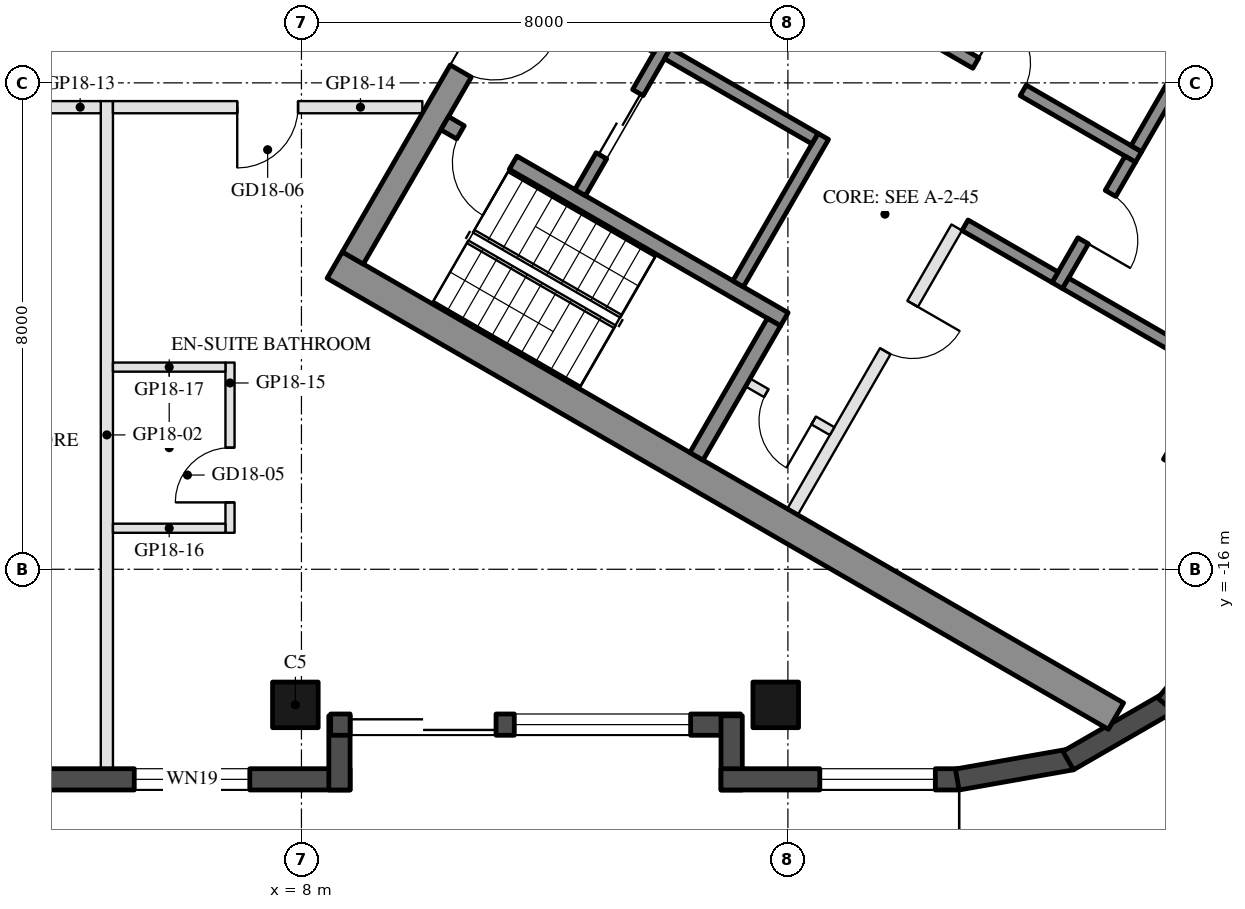
"""IFC4 building model, lengths in metres.
Left out: names, types, materials, properties, quantities, classifications, styles, units other than length and angle.
Written with IfcOpenShell. Run it as: python <this file> out.ifc"""

import sys

from ifc_helpers import new_model, si_unit, direction, frame, frame_2d, origin, origin_2d, place, context, subcontext, project, spatial, rectangle, hollow_rectangle, extrude, element, fill, save


model = new_model("IFC4")
c1 = context("Model", 3, precision=1e-05, world=origin(), true_north=direction((0.0, 1.0)))
c2 = subcontext(c1, "Body", "Model", "MODEL_VIEW")
j1 = project(units=[si_unit("LENGTHUNIT", "METRE"), si_unit("PLANEANGLEUNIT", "RADIAN")], contexts=[c1])
p1 = place(None, origin())
s1 = spatial("IfcSite", under=j1, at=p1, CompositionType="ELEMENT")
p2 = place(p1, origin())
s2 = spatial("IfcBuilding", under=s1, at=p2, CompositionType="ELEMENT")
p3 = place(p2, frame((0.0, 0.0, 194.7)))
s3 = spatial("IfcBuildingStorey", under=s2, at=p3, CompositionType="ELEMENT", Elevation=194.7)
for number, where, z_axis, x_axis in (
    (1, (7.9, -18.23, 0.0), (0.0, 0.0, 1.0), (-1.0, 0.0, 0.0)),
    (2, (15.8, -18.23, 0.0), (0.0, 0.0, 1.0), (-1.0, 0.0, 0.0)),
):
    element("IfcColumn", number, at=place(p3, frame(where, z_axis=z_axis, x_axis=x_axis)), inside=s3, PredefinedType="COLUMN", context=c2, shape_type="SweptSolid", body=[
        extrude(hollow_rectangle(XDim=0.75, YDim=0.75, WallThickness=0.035, at=origin_2d()), origin(), (0.0, 0.0, 1.0), 3.7),
    ])
p4 = place(p3, frame((23.729, -13.7, 0.0), z_axis=(0.0, 0.0, 1.0), x_axis=(0.5, 0.866025403784, 0.0)))
e3 = element("IfcColumn", 3, at=p4, inside=s3, PredefinedType="COLUMN", context=c2, shape_type="SweptSolid", body=[
    extrude(hollow_rectangle(XDim=2.4, YDim=2.2, WallThickness=0.06, at=origin_2d()), origin(), (0.0, 0.0, 1.0), 3.7),
])
p5 = place(p3, frame((-0.9, -19.455, 0.0), z_axis=(0.0, 0.0, 1.0), x_axis=(1.0, 0.0, 0.0)))
e4 = element("IfcWall", 4, at=p5, inside=s3, PredefinedType="SOLIDWALL", context=c2, shape_type="SweptSolid", body=[
    extrude(rectangle(XDim=9.7, YDim=0.35, at=frame_2d((4.85, 0.0))), origin(), (0.0, 0.0, 1.0), 3.55),
])
p6 = place(p5, frame((6.15, 0.0, 0.3)))
e5 = element("IfcOpeningElement", 5, at=p6, cuts=e4, PredefinedType="OPENING", context=c2, shape_type="SweptSolid", body=[
    extrude(rectangle(XDim=1.9, YDim=2.65, at=frame_2d((0.95, 1.325))), frame((0.0, 0.185, 0.0), z_axis=(0.0, -1.0, 0.0), x_axis=(1.0, 0.0, 0.0)), (0.0, 0.0, 1.0), 0.37),
])
p7 = place(p3, frame((8.625, -19.63, 0.0), z_axis=(0.0, 0.0, 1.0), x_axis=(0.0, 1.0, 0.0)))
e6 = element("IfcWall", 6, at=p7, inside=s3, PredefinedType="SOLIDWALL", context=c2, shape_type="SweptSolid", body=[
    extrude(rectangle(XDim=1.22, YDim=0.35, at=frame_2d((0.61, 0.0))), origin(), (0.0, 0.0, 1.0), 3.55),
])
p8 = place(p3, frame((8.48, -18.555, 0.0), z_axis=(0.0, 0.0, 1.0), x_axis=(1.0, 0.0, 0.0)))
e7 = element("IfcWall", 7, at=p8, inside=s3, PredefinedType="SOLIDWALL", context=c2, shape_type="SweptSolid", body=[
    extrude(rectangle(XDim=6.74, YDim=0.35, at=frame_2d((3.37, 0.0))), origin(), (0.0, 0.0, 1.0), 3.55),
])
p9 = place(p8, frame((0.32, 0.0, 0.0)))
e8 = element("IfcOpeningElement", 8, at=p9, cuts=e7, PredefinedType="OPENING", context=c2, shape_type="SweptSolid", body=[
    extrude(rectangle(XDim=2.4, YDim=2.4, at=frame_2d((1.2, 1.2))), frame((0.0, 0.185, 0.0), z_axis=(0.0, -1.0, 0.0), x_axis=(1.0, 0.0, 0.0)), (0.0, 0.0, 1.0), 0.37),
])
p10 = place(p8, frame((3.02, 0.0, 0.3)))
e9 = element("IfcOpeningElement", 9, at=p10, cuts=e7, PredefinedType="OPENING", context=c2, shape_type="SweptSolid", body=[
    extrude(rectangle(XDim=2.9, YDim=2.65, at=frame_2d((1.45, 1.325))), frame((0.0, 0.185, 0.0), z_axis=(0.0, -1.0, 0.0), x_axis=(1.0, 0.0, 0.0)), (0.0, 0.0, 1.0), 0.37),
])
p11 = place(p3, frame((15.075, -18.41, 0.0), z_axis=(0.0, 0.0, 1.0), x_axis=(0.0, -1.0, 0.0)))
e10 = element("IfcWall", 10, at=p11, inside=s3, PredefinedType="SOLIDWALL", context=c2, shape_type="SweptSolid", body=[
    extrude(rectangle(XDim=1.22, YDim=0.35, at=frame_2d((0.61, 0.0))), origin(), (0.0, 0.0, 1.0), 3.55),
])
p12 = place(p3, frame((14.9, -19.455, 0.0), z_axis=(0.0, 0.0, 1.0), x_axis=(1.0, 0.0, 0.0)))
e11 = element("IfcWall", 11, at=p12, inside=s3, PredefinedType="SOLIDWALL", context=c2, shape_type="SweptSolid", body=[
    extrude(rectangle(XDim=3.916, YDim=0.35, at=frame_2d((1.958, 0.0))), origin(), (0.0, 0.0, 1.0), 3.55),
])
p13 = place(p12, frame((1.625, 0.0, 0.3)))
e12 = element("IfcOpeningElement", 12, at=p13, cuts=e11, PredefinedType="OPENING", context=c2, shape_type="SweptSolid", body=[
    extrude(rectangle(XDim=1.9, YDim=2.65, at=frame_2d((0.95, 1.325))), frame((0.0, 0.185, 0.0), z_axis=(0.0, -1.0, 0.0), x_axis=(1.0, 0.0, 0.0)), (0.0, 0.0, 1.0), 0.37),
])
p14 = place(p3, frame((18.785, -19.458, 0.0), z_axis=(0.0, 0.0, 1.0), x_axis=(0.984798995425, 0.173697837091, 0.0)))
e13 = element("IfcWall", 13, at=p14, inside=s3, PredefinedType="SOLIDWALL", context=c2, shape_type="SweptSolid", body=[
    extrude(rectangle(XDim=1.91, YDim=0.35, at=frame_2d((0.955, 0.0))), origin(), (0.0, 0.0, 1.0), 3.55),
])
for number, where, z_axis, x_axis in (
    (14, (20.61, -19.147, 0.0), (0.0, 0.0, 1.0), (0.866, 0.5, 0.0)),
    (15, (22.217, -18.231, 0.0), (0.0, 0.0, 1.0), (0.643, 0.766, 0.0)),
):
    element("IfcWall", number, at=place(p3, frame(where, z_axis=z_axis, x_axis=x_axis)), inside=s3, PredefinedType="SOLIDWALL", context=c2, shape_type="SweptSolid", body=[
        extrude(rectangle(XDim=1.91, YDim=0.35, at=frame_2d((0.955, 0.0))), origin(), (0.0, 0.0, 1.0), 3.55),
    ])
for number, where, z_axis, x_axis in (
    (16, (8.547, -10.997, 0.0), (0.0, 0.0, 1.0), (0.866, -0.5, 0.0)),
    (17, (13.797, -1.903, 0.0), (0.0, 0.0, 1.0), (0.866, -0.5, 0.0)),
):
    element("IfcWall", number, at=place(p3, frame(where, z_axis=z_axis, x_axis=x_axis)), inside=s3, PredefinedType="SHEAR", context=c2, shape_type="SweptSolid", body=[
        extrude(rectangle(XDim=14.837, YDim=0.5, at=frame_2d((7.418, 0.0))), origin(), (0.0, 0.0, 1.0), 3.5),
    ])
p15 = place(p3, frame((8.845, -10.88, 0.0), z_axis=(0.0, 0.0, 1.0), x_axis=(0.500004234368, 0.866022959057, 0.0)))
e18 = element("IfcWall", 18, at=p15, inside=s3, PredefinedType="SHEAR", context=c2, shape_type="SweptSolid", body=[
    extrude(rectangle(XDim=10.0, YDim=0.4, at=frame_2d((5.0, 0.0))), origin(), (0.0, 0.0, 1.0), 3.5),
])
p16 = place(p15, frame((3.55, 0.0, 0.0)))
e19 = element("IfcOpeningElement", 19, at=p16, cuts=e18, PredefinedType="OPENING", context=c2, shape_type="SweptSolid", body=[
    extrude(rectangle(XDim=1.1, YDim=2.1, at=frame_2d((0.55, 1.05))), frame((0.0, 0.21, 0.0), z_axis=(0.0, -1.0, 0.0), x_axis=(1.0, 0.0, 0.0)), (0.0, 0.0, 1.0), 0.42),
])
p17 = place(p15, frame((5.85, 0.0, 0.0)))
e20 = element("IfcOpeningElement", 20, at=p17, cuts=e18, PredefinedType="OPENING", context=c2, shape_type="SweptSolid", body=[
    extrude(rectangle(XDim=1.4, YDim=2.1, at=frame_2d((0.7, 1.05))), frame((0.0, 0.21, 0.0), z_axis=(0.0, -1.0, 0.0), x_axis=(1.0, 0.0, 0.0)), (0.0, 0.0, 1.0), 0.42),
])
p18 = place(p3, frame((10.356, -8.664, 0.0), z_axis=(0.0, 0.0, 1.0), x_axis=(0.866028629588, -0.499994412703, 0.0)))
e21 = element("IfcWall", 21, at=p18, inside=s3, PredefinedType="SHEAR", context=c2, shape_type="SweptSolid", body=[
    extrude(rectangle(XDim=6.45, YDim=0.25, at=frame_2d((3.225, 0.0))), origin(), (0.0, 0.0, 1.0), 3.5),
])
p19 = place(p18, frame((0.3, 0.0, 0.0)))
e22 = element("IfcOpeningElement", 22, at=p19, cuts=e21, PredefinedType="OPENING", context=c2, shape_type="SweptSolid", body=[
    extrude(rectangle(XDim=1.0, YDim=2.1, at=frame_2d((0.5, 1.05))), frame((0.0, 0.135, 0.0), z_axis=(0.0, -1.0, 0.0), x_axis=(1.0, 0.0, 0.0)), (0.0, 0.0, 1.0), 0.27),
])
p20 = place(p3, frame((14.496, -14.143, 0.0), z_axis=(0.0, 0.0, 1.0), x_axis=(0.500062241894, 0.865989465428, 0.0)))
e23 = element("IfcWall", 23, at=p20, inside=s3, PredefinedType="SHEAR", context=c2, shape_type="SweptSolid", body=[
    extrude(rectangle(XDim=2.55, YDim=0.25, at=frame_2d((1.275, 0.0))), origin(), (0.0, 0.0, 1.0), 3.5),
])
p21 = place(p3, frame((15.181, -11.305, 0.0), z_axis=(0.0, 0.0, 1.0), x_axis=(0.49994636267, 0.866056369097, 0.0)))
e24 = element("IfcWall", 24, at=p21, inside=s3, PredefinedType="SHEAR", context=c2, shape_type="SweptSolid", body=[
    extrude(rectangle(XDim=2.8, YDim=0.2, at=frame_2d((1.4, 0.0))), origin(), (0.0, 0.0, 1.0), 3.5),
])
p22 = place(p3, frame((12.583, -9.805, 0.0), z_axis=(0.0, 0.0, 1.0), x_axis=(0.49994636267, 0.866056369097, 0.0)))
e25 = element("IfcWall", 25, at=p22, inside=s3, PredefinedType="SHEAR", context=c2, shape_type="SweptSolid", body=[
    extrude(rectangle(XDim=2.8, YDim=0.2, at=frame_2d((1.4, 0.0))), origin(), (0.0, 0.0, 1.0), 3.5),
])
p23 = place(p22, frame((0.7, 0.0, 0.0)))
e26 = element("IfcOpeningElement", 26, at=p23, cuts=e25, PredefinedType="OPENING", context=c2, shape_type="SweptSolid", body=[
    extrude(rectangle(XDim=1.2, YDim=2.1, at=frame_2d((0.6, 1.05))), frame((0.0, 0.11, 0.0), z_axis=(0.0, -1.0, 0.0), x_axis=(1.0, 0.0, 0.0)), (0.0, 0.0, 1.0), 0.22),
])
p24 = place(p3, frame((11.768, -6.217, 0.0), z_axis=(0.0, 0.0, 1.0), x_axis=(0.866050077142, -0.499957262057, 0.0)))
e27 = element("IfcWall", 27, at=p24, inside=s3, PredefinedType="SHEAR", context=c2, shape_type="SweptSolid", body=[
    extrude(rectangle(XDim=2.4, YDim=0.2, at=frame_2d((1.2, 0.0))), origin(), (0.0, 0.0, 1.0), 3.5),
])
p25 = place(p3, frame((14.02, -7.517, 0.0), z_axis=(0.0, 0.0, 1.0), x_axis=(0.866034573852, -0.49998411664, 0.0)))
e28 = element("IfcWall", 28, at=p25, inside=s3, PredefinedType="SHEAR", context=c2, shape_type="SweptSolid", body=[
    extrude(rectangle(XDim=2.8, YDim=0.2, at=frame_2d((1.4, 0.0))), origin(), (0.0, 0.0, 1.0), 3.5),
])
p26 = place(p3, frame((12.968, -4.138, 0.0), z_axis=(0.0, 0.0, 1.0), x_axis=(0.866028328073, -0.49999493495, 0.0)))
e29 = element("IfcWall", 29, at=p26, inside=s3, PredefinedType="SHEAR", context=c2, shape_type="SweptSolid", body=[
    extrude(rectangle(XDim=10.16, YDim=0.2, at=frame_2d((5.08, 0.0))), origin(), (0.0, 0.0, 1.0), 3.5),
])
p27 = place(p26, frame((1.99, 0.0, 0.0)))
e30 = element("IfcOpeningElement", 30, at=p27, cuts=e29, PredefinedType="OPENING", context=c2, shape_type="SweptSolid", body=[
    extrude(rectangle(XDim=0.9, YDim=2.1, at=frame_2d((0.45, 1.05))), frame((0.0, 0.11, 0.0), z_axis=(0.0, -1.0, 0.0), x_axis=(1.0, 0.0, 0.0)), (0.0, 0.0, 1.0), 0.22),
])
p28 = place(p26, frame((7.07, 0.0, 0.0)))
e31 = element("IfcOpeningElement", 31, at=p28, cuts=e29, PredefinedType="OPENING", context=c2, shape_type="SweptSolid", body=[
    extrude(rectangle(XDim=0.9, YDim=2.1, at=frame_2d((0.45, 1.05))), frame((0.0, 0.11, 0.0), z_axis=(0.0, -1.0, 0.0), x_axis=(1.0, 0.0, 0.0)), (0.0, 0.0, 1.0), 0.22),
])
p29 = place(p3, frame((20.43, -11.333, 0.0), z_axis=(0.0, 0.0, 1.0), x_axis=(0.500001309137, 0.866024647952, 0.0)))
e32 = element("IfcWall", 32, at=p29, inside=s3, PredefinedType="SHEAR", context=c2, shape_type="SweptSolid", body=[
    extrude(rectangle(XDim=2.4, YDim=0.2, at=frame_2d((1.2, 0.0))), origin(), (0.0, 0.0, 1.0), 3.5),
])
p30 = place(p29, frame((0.85, 0.0, 0.0)))
e33 = element("IfcOpeningElement", 33, at=p30, cuts=e32, PredefinedType="OPENING", context=c2, shape_type="SweptSolid", body=[
    extrude(rectangle(XDim=0.9, YDim=2.1, at=frame_2d((0.45, 1.05))), frame((0.0, 0.11, 0.0), z_axis=(0.0, -1.0, 0.0), x_axis=(1.0, 0.0, 0.0)), (0.0, 0.0, 1.0), 0.22),
])
p31 = place(p3, frame((18.913, -10.342, 0.0), z_axis=(0.0, 0.0, 1.0), x_axis=(0.866038183914, -0.499977863513, 0.0)))
e34 = element("IfcWall", 34, at=p31, inside=s3, PredefinedType="SHEAR", context=c2, shape_type="SweptSolid", body=[
    extrude(rectangle(XDim=1.71, YDim=0.2, at=frame_2d((0.855, 0.0))), origin(), (0.0, 0.0, 1.0), 3.5),
])
p32 = place(p3, frame((21.73, -9.082, 0.0), z_axis=(0.0, 0.0, 1.0), x_axis=(0.50002537861, 0.866010750942, 0.0)))
e35 = element("IfcWall", 35, at=p32, inside=s3, PredefinedType="SHEAR", context=c2, shape_type="SweptSolid", body=[
    extrude(rectangle(XDim=2.0, YDim=0.2, at=frame_2d((1.0, 0.0))), origin(), (0.0, 0.0, 1.0), 3.5),
])
p33 = place(p3, frame((20.567, -11.297, 0.0), z_axis=(0.0, 0.0, 1.0), x_axis=(0.866055327414, -0.49994816717, 0.0)))
e36 = element("IfcWall", 36, at=p33, inside=s3, PredefinedType="SHEAR", context=c2, shape_type="SweptSolid", body=[
    extrude(rectangle(XDim=2.84, YDim=0.2, at=frame_2d((1.42, 0.0))), origin(), (0.0, 0.0, 1.0), 3.5),
])
p34 = place(p3, frame((16.076, -15.055, 0.0), z_axis=(0.0, 0.0, 1.0), x_axis=(0.499995103361, 0.866028230842, 0.0)))
e37 = element("IfcWall", 37, at=p34, inside=s3, PredefinedType="PARTITIONING", context=c2, shape_type="SweptSolid", body=[
    extrude(rectangle(XDim=5.4, YDim=0.2, at=frame_2d((2.7, 0.0))), origin(), (0.0, 0.0, 1.0), 3.5),
])
p35 = place(p34, frame((3.05, 0.0, 0.0)))
e38 = element("IfcOpeningElement", 38, at=p35, cuts=e37, PredefinedType="OPENING", context=c2, shape_type="SweptSolid", body=[
    extrude(rectangle(XDim=0.9, YDim=2.1, at=frame_2d((0.45, 1.05))), frame((0.0, 0.11, 0.0), z_axis=(0.0, -1.0, 0.0), x_axis=(1.0, 0.0, 0.0)), (0.0, 0.0, 1.0), 0.22),
])
p36 = place(p3, frame((15.342, -12.928, 0.0), z_axis=(0.0, 0.0, 1.0), x_axis=(0.865989903783, -0.500061482766, 0.0)))
e39 = element("IfcWall", 39, at=p36, inside=s3, PredefinedType="PARTITIONING", context=c2, shape_type="SweptSolid", body=[
    extrude(rectangle(XDim=1.6, YDim=0.15, at=frame_2d((0.8, 0.0))), origin(), (0.0, 0.0, 1.0), 3.5),
])
p37 = place(p36, frame((0.35, 0.0, 0.0)))
e40 = element("IfcOpeningElement", 40, at=p37, cuts=e39, PredefinedType="OPENING", context=c2, shape_type="SweptSolid", body=[
    extrude(rectangle(XDim=0.9, YDim=2.1, at=frame_2d((0.45, 1.05))), frame((0.0, 0.085, 0.0), z_axis=(0.0, -1.0, 0.0), x_axis=(1.0, 0.0, 0.0)), (0.0, 0.0, 1.0), 0.17),
])
p38 = place(p3, frame((4.8, -19.28, 0.0), z_axis=(0.0, 0.0, 1.0), x_axis=(0.0, 1.0, 0.0)))
e41 = element("IfcWall", 41, at=p38, inside=s3, PredefinedType="PARTITIONING", context=c2, shape_type="SweptSolid", body=[
    extrude(rectangle(XDim=10.98, YDim=0.2, at=frame_2d((5.49, 0.0))), origin(), (0.0, 0.0, 1.0), 3.06),
])
p39 = place(p3, frame((4.7, -8.4, 0.0), z_axis=(0.0, 0.0, 1.0), x_axis=(-1.0, 0.0, 0.0)))
e42 = element("IfcWall", 42, at=p39, inside=s3, PredefinedType="PARTITIONING", context=c2, shape_type="SweptSolid", body=[
    extrude(rectangle(XDim=2.826, YDim=0.2, at=frame_2d((1.413, 0.0))), origin(), (0.0, 0.0, 1.0), 2.95),
])
p40 = place(p39, frame((0.963, 0.0, 0.0)))
e43 = element("IfcOpeningElement", 43, at=p40, cuts=e42, PredefinedType="OPENING", context=c2, shape_type="SweptSolid", body=[
    extrude(rectangle(XDim=0.9, YDim=2.1, at=frame_2d((0.45, 1.05))), frame((0.0, 0.11, 0.0), z_axis=(0.0, -1.0, 0.0), x_axis=(1.0, 0.0, 0.0)), (0.0, 0.0, 1.0), 0.22),
])
p41 = place(p3, frame((9.988, -8.4, 0.0), z_axis=(0.0, 0.0, 1.0), x_axis=(-1.0, 0.0, 0.0)))
e44 = element("IfcWall", 44, at=p41, inside=s3, PredefinedType="PARTITIONING", context=c2, shape_type="SweptSolid", body=[
    extrude(rectangle(XDim=5.088, YDim=0.2, at=frame_2d((2.544, 0.0))), origin(), (0.0, 0.0, 1.0), 2.95),
])
p42 = place(p41, frame((2.044, 0.0, 0.0)))
e45 = element("IfcOpeningElement", 45, at=p42, cuts=e44, PredefinedType="OPENING", context=c2, shape_type="SweptSolid", body=[
    extrude(rectangle(XDim=1.0, YDim=2.1, at=frame_2d((0.5, 1.05))), frame((0.0, 0.11, 0.0), z_axis=(0.0, -1.0, 0.0), x_axis=(1.0, 0.0, 0.0)), (0.0, 0.0, 1.0), 0.22),
])
p43 = place(p3, frame((6.825, -15.4, 0.0), z_axis=(0.0, 0.0, 1.0), x_axis=(0.0, 1.0, 0.0)))
e46 = element("IfcWall", 46, at=p43, inside=s3, PredefinedType="PARTITIONING", context=c2, shape_type="SweptSolid", body=[
    extrude(rectangle(XDim=2.8, YDim=0.15, at=frame_2d((1.4, 0.0))), origin(), (0.0, 0.0, 1.0), 3.55),
])
p44 = place(p43, frame((0.5, 0.0, 0.0)))
e47 = element("IfcOpeningElement", 47, at=p44, cuts=e46, PredefinedType="OPENING", context=c2, shape_type="SweptSolid", body=[
    extrude(rectangle(XDim=0.9, YDim=2.1, at=frame_2d((0.45, 1.05))), frame((0.0, 0.085, 0.0), z_axis=(0.0, -1.0, 0.0), x_axis=(1.0, 0.0, 0.0)), (0.0, 0.0, 1.0), 0.17),
])
for number, where, z_axis, x_axis in (
    (48, (4.9, -15.325, 0.0), (0.0, 0.0, 1.0), (1.0, 0.0, 0.0)),
    (49, (4.9, -12.675, 0.0), (0.0, 0.0, 1.0), (1.0, 0.0, 0.0)),
):
    element("IfcWall", number, at=place(p3, frame(where, z_axis=z_axis, x_axis=x_axis)), inside=s3, PredefinedType="PARTITIONING", context=c2, shape_type="SweptSolid", body=[
        extrude(rectangle(XDim=1.85, YDim=0.15, at=frame_2d((0.925, 0.0))), origin(), (0.0, 0.0, 1.0), 3.55),
    ])
p45 = place(p6, origin())
e50 = element("IfcWindow", 50, at=p45, inside=s3, PartitioningType="SINGLE_PANEL", PredefinedType="WINDOW", context=c2, shape_type="SweptSolid", body=[
    extrude(rectangle(XDim=1.9, YDim=2.65, at=frame_2d((0.95, 1.325))), frame((0.0, 0.03, 0.0), z_axis=(0.0, -1.0, 0.0), x_axis=(1.0, 0.0, 0.0)), (0.0, 0.0, 1.0), 0.06),
])
fill(e5, e50)
p46 = place(p9, frame((2.4, 0.0, 0.0), z_axis=(0.0, 0.0, 1.0), x_axis=(-1.0, 0.0, 0.0)))
e51 = element("IfcDoor", 51, at=p46, inside=s3, OperationType="SLIDING_TO_LEFT", PredefinedType="DOOR", context=c2, shape_type="SweptSolid", body=[
    extrude(rectangle(XDim=2.4, YDim=2.4, at=frame_2d((1.2, 1.2))), frame((0.0, 0.025, 0.0), z_axis=(0.0, -1.0, 0.0), x_axis=(1.0, 0.0, 0.0)), (0.0, 0.0, 1.0), 0.05),
])
fill(e8, e51)
p47 = place(p10, origin())
e52 = element("IfcWindow", 52, at=p47, inside=s3, PartitioningType="SINGLE_PANEL", PredefinedType="WINDOW", context=c2, shape_type="SweptSolid", body=[
    extrude(rectangle(XDim=2.9, YDim=2.65, at=frame_2d((1.45, 1.325))), frame((0.0, 0.03, 0.0), z_axis=(0.0, -1.0, 0.0), x_axis=(1.0, 0.0, 0.0)), (0.0, 0.0, 1.0), 0.06),
])
fill(e9, e52)
p48 = place(p13, origin())
e53 = element("IfcWindow", 53, at=p48, inside=s3, PartitioningType="SINGLE_PANEL", PredefinedType="WINDOW", context=c2, shape_type="SweptSolid", body=[
    extrude(rectangle(XDim=1.9, YDim=2.65, at=frame_2d((0.95, 1.325))), frame((0.0, 0.03, 0.0), z_axis=(0.0, -1.0, 0.0), x_axis=(1.0, 0.0, 0.0)), (0.0, 0.0, 1.0), 0.06),
])
fill(e12, e53)
p49 = place(p23, origin())
e54 = element("IfcDoor", 54, at=p49, inside=s3, OperationType="DOUBLE_DOOR_SLIDING", PredefinedType="DOOR", context=c2, shape_type="SweptSolid", body=[
    extrude(rectangle(XDim=1.2, YDim=2.1, at=frame_2d((0.6, 1.05))), frame((0.0, 0.025, 0.0), z_axis=(0.0, -1.0, 0.0), x_axis=(1.0, 0.0, 0.0)), (0.0, 0.0, 1.0), 0.05),
])
fill(e26, e54)
p50 = place(p37, frame((0.9, 0.0, 0.0), z_axis=(0.0, 0.0, 1.0), x_axis=(-1.0, 0.0, 0.0)))
e55 = element("IfcDoor", 55, at=p50, inside=s3, OperationType="SINGLE_SWING_LEFT", PredefinedType="DOOR", context=c2, shape_type="SweptSolid", body=[
    extrude(rectangle(XDim=0.9, YDim=2.1, at=frame_2d((0.45, 1.05))), frame((0.0, 0.025, 0.0), z_axis=(0.0, -1.0, 0.0), x_axis=(1.0, 0.0, 0.0)), (0.0, 0.0, 1.0), 0.05),
])
fill(e40, e55)
p51 = place(p28, origin())
e56 = element("IfcDoor", 56, at=p51, inside=s3, OperationType="SINGLE_SWING_LEFT", PredefinedType="DOOR", context=c2, shape_type="SweptSolid", body=[
    extrude(rectangle(XDim=0.9, YDim=2.1, at=frame_2d((0.45, 1.05))), frame((0.0, 0.025, 0.0), z_axis=(0.0, -1.0, 0.0), x_axis=(1.0, 0.0, 0.0)), (0.0, 0.0, 1.0), 0.05),
])
fill(e31, e56)
p52 = place(p30, frame((0.9, 0.0, 0.0), z_axis=(0.0, 0.0, 1.0), x_axis=(-1.0, 0.0, 0.0)))
e57 = element("IfcDoor", 57, at=p52, inside=s3, OperationType="SINGLE_SWING_RIGHT", PredefinedType="DOOR", context=c2, shape_type="SweptSolid", body=[
    extrude(rectangle(XDim=0.9, YDim=2.1, at=frame_2d((0.45, 1.05))), frame((0.0, 0.025, 0.0), z_axis=(0.0, -1.0, 0.0), x_axis=(1.0, 0.0, 0.0)), (0.0, 0.0, 1.0), 0.05),
])
fill(e33, e57)
p53 = place(p35, frame((0.9, 0.0, 0.0), z_axis=(0.0, 0.0, 1.0), x_axis=(-1.0, 0.0, 0.0)))
e58 = element("IfcDoor", 58, at=p53, inside=s3, OperationType="SINGLE_SWING_LEFT", PredefinedType="DOOR", context=c2, shape_type="SweptSolid", body=[
    extrude(rectangle(XDim=0.9, YDim=2.1, at=frame_2d((0.45, 1.05))), frame((0.0, 0.025, 0.0), z_axis=(0.0, -1.0, 0.0), x_axis=(1.0, 0.0, 0.0)), (0.0, 0.0, 1.0), 0.05),
])
fill(e38, e58)
p54 = place(p16, frame((1.1, 0.0, 0.0), z_axis=(0.0, 0.0, 1.0), x_axis=(-1.0, 0.0, 0.0)))
e59 = element("IfcDoor", 59, at=p54, inside=s3, OperationType="SINGLE_SWING_LEFT", PredefinedType="DOOR", context=c2, shape_type="SweptSolid", body=[
    extrude(rectangle(XDim=1.1, YDim=2.1, at=frame_2d((0.55, 1.05))), frame((0.0, 0.025, 0.0), z_axis=(0.0, -1.0, 0.0), x_axis=(1.0, 0.0, 0.0)), (0.0, 0.0, 1.0), 0.05),
])
fill(e19, e59)
p55 = place(p19, frame((1.0, 0.0, 0.0), z_axis=(0.0, 0.0, 1.0), x_axis=(-1.0, 0.0, 0.0)))
e60 = element("IfcDoor", 60, at=p55, inside=s3, OperationType="SINGLE_SWING_LEFT", PredefinedType="DOOR", context=c2, shape_type="SweptSolid", body=[
    extrude(rectangle(XDim=1.0, YDim=2.1, at=frame_2d((0.5, 1.05))), frame((0.0, 0.025, 0.0), z_axis=(0.0, -1.0, 0.0), x_axis=(1.0, 0.0, 0.0)), (0.0, 0.0, 1.0), 0.05),
])
fill(e22, e60)
p56 = place(p44, origin())
e61 = element("IfcDoor", 61, at=p56, inside=s3, OperationType="SINGLE_SWING_LEFT", PredefinedType="DOOR", context=c2, shape_type="SweptSolid", body=[
    extrude(rectangle(XDim=0.9, YDim=2.1, at=frame_2d((0.45, 1.05))), frame((0.0, 0.025, 0.0), z_axis=(0.0, -1.0, 0.0), x_axis=(1.0, 0.0, 0.0)), (0.0, 0.0, 1.0), 0.05),
])
fill(e47, e61)
p57 = place(p42, origin())
e62 = element("IfcDoor", 62, at=p57, inside=s3, OperationType="SINGLE_SWING_RIGHT", PredefinedType="DOOR", context=c2, shape_type="SweptSolid", body=[
    extrude(rectangle(XDim=1.0, YDim=2.1, at=frame_2d((0.5, 1.05))), frame((0.0, 0.025, 0.0), z_axis=(0.0, -1.0, 0.0), x_axis=(1.0, 0.0, 0.0)), (0.0, 0.0, 1.0), 0.05),
])
fill(e45, e62)
save(model, sys.argv[1])
